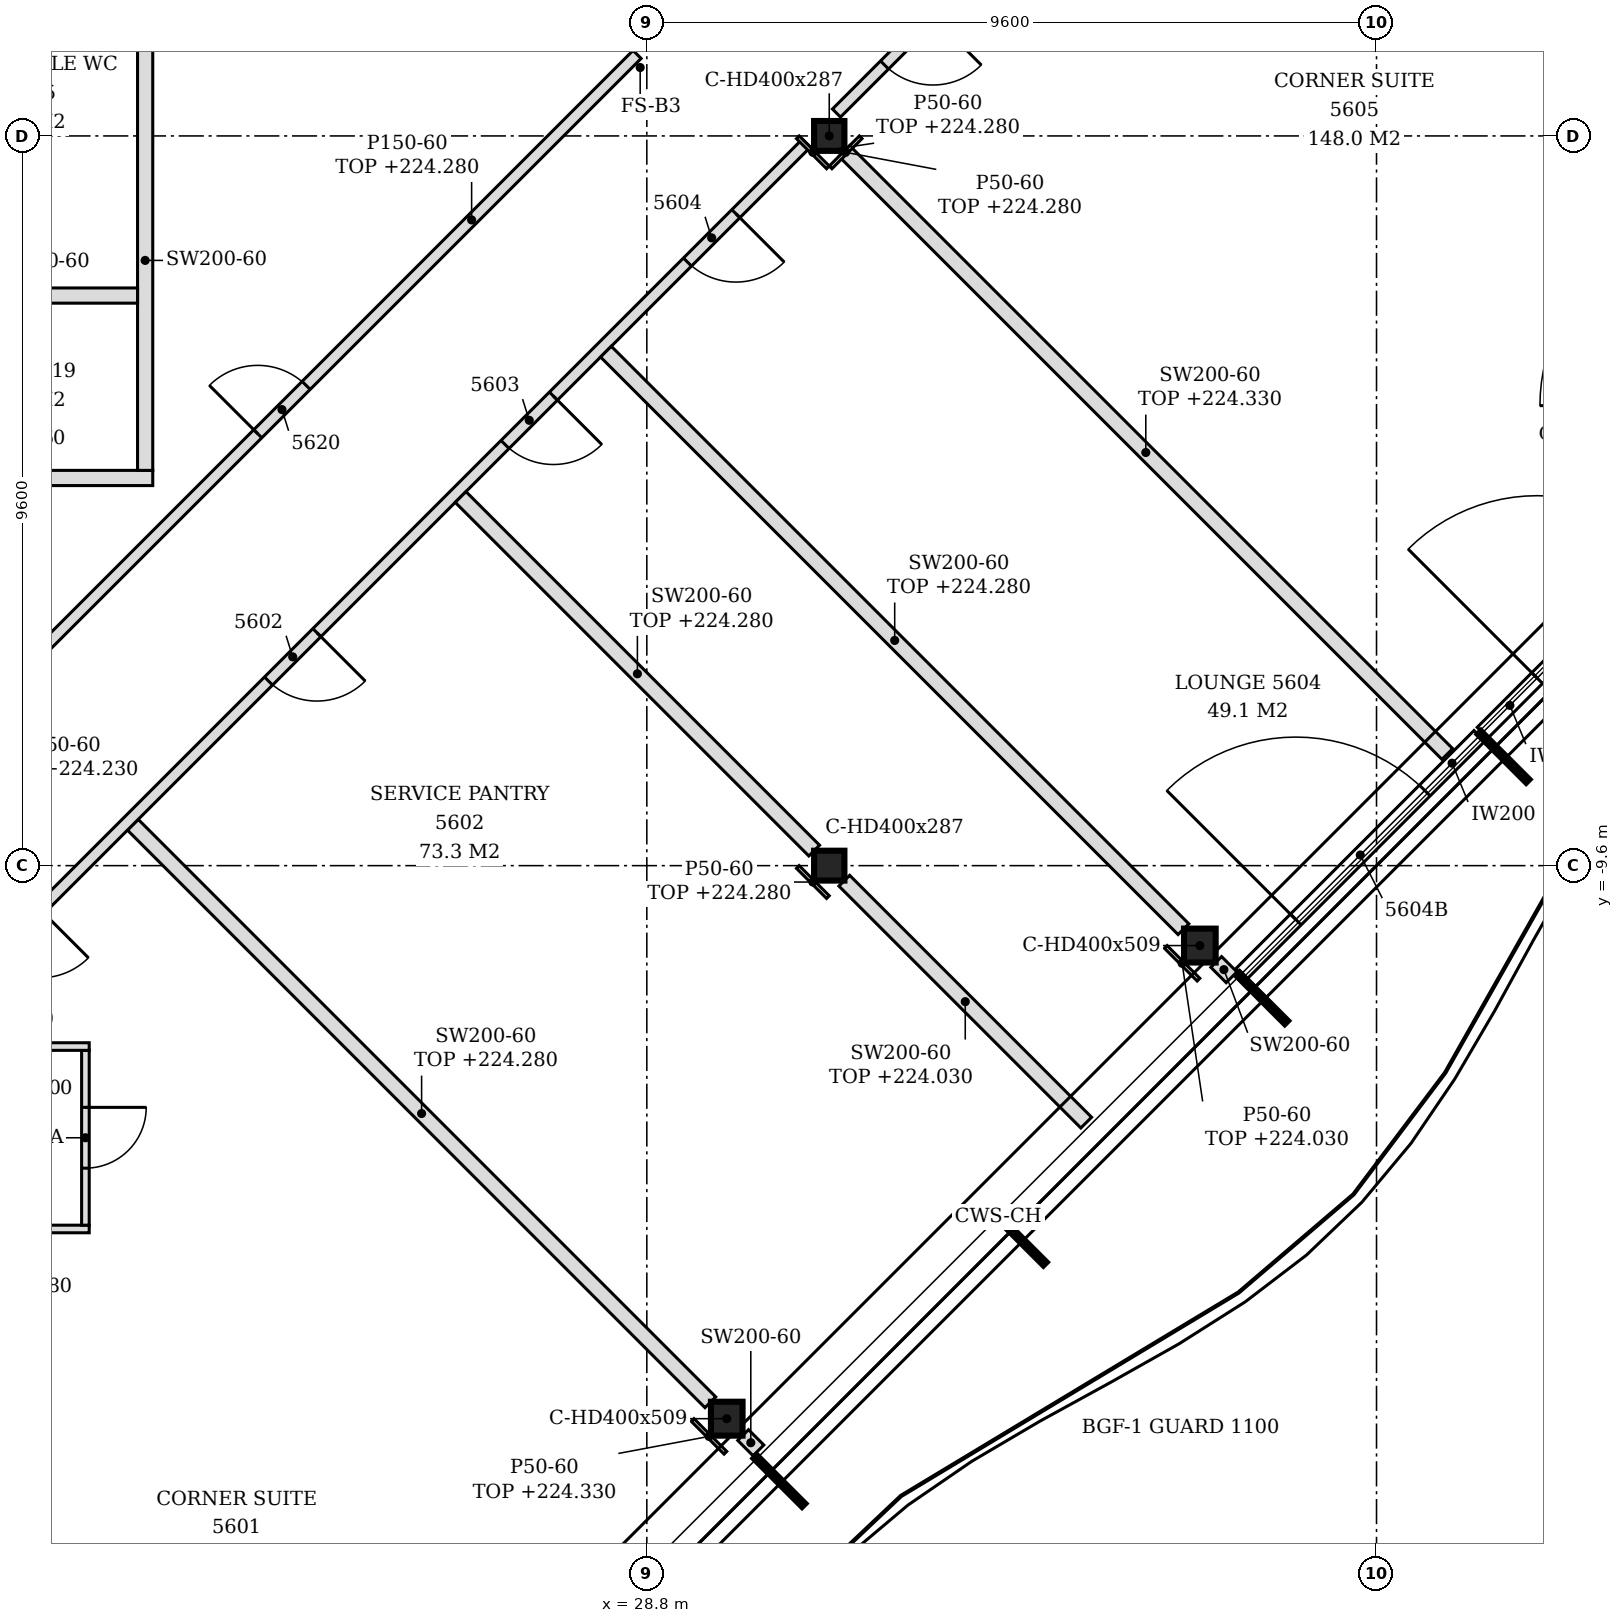
"""IFC4 building model, lengths in metres.
Left out: names, types, materials, properties, quantities, classifications, styles, units other than length and angle.
Written with IfcOpenShell. Run it as: python <this file> out.ifc"""

import sys

from ifc_helpers import new_model, si_unit, direction, frame, frame_2d, origin, origin_2d, place, context, subcontext, project, spatial, polyline, rectangle, i_section, outline, extrude, element, fill, save


model = new_model("IFC4")
c1 = context("Model", 3, precision=1e-05, world=origin(), true_north=direction((0.0, 1.0)))
c2 = subcontext(c1, "Body", "Model", "MODEL_VIEW")
j1 = project(units=[si_unit("LENGTHUNIT", "METRE"), si_unit("PLANEANGLEUNIT", "RADIAN")], contexts=[c1])
p1 = place(None, origin())
s1 = spatial("IfcSite", under=j1, at=p1, CompositionType="ELEMENT")
p2 = place(p1, origin())
s2 = spatial("IfcBuilding", under=s1, at=p2, CompositionType="ELEMENT")
p3 = place(p2, frame((0.0, 0.0, 221.4)))
s3 = spatial("IfcBuildingStorey", under=s2, at=p3, CompositionType="ELEMENT", Elevation=221.4)
for number, where, z_axis, x_axis in (
    (1, (29.852, -16.876, -0.15), (0.0, 0.0, 1.0), (1.0, 0.0, 0.0)),
    (2, (36.076, -10.652, -0.15), (0.0, 0.0, 1.0), (1.0, 0.0, 0.0)),
):
    element("IfcColumn", number, at=place(p3, frame(where, z_axis=z_axis, x_axis=x_axis)), inside=s3, PredefinedType="COLUMN", context=c2, shape_type="SweptSolid", body=[
        extrude(i_section(OverallWidth=0.416, OverallDepth=0.446, WebThickness=0.039, FlangeThickness=0.063, FilletRadius=0.015, at=origin_2d()), origin(), (0.0, 0.0, 1.0), 3.6),
    ])
for number, where, z_axis, x_axis in (
    (3, (31.2, -9.6, -0.15), (0.0, 0.0, 1.0), (1.0, 0.0, 0.0)),
    (4, (31.2, 0.0, -0.15), (0.0, 0.0, 1.0), (1.0, 0.0, 0.0)),
):
    element("IfcColumn", number, at=place(p3, frame(where, z_axis=z_axis, x_axis=x_axis)), inside=s3, PredefinedType="COLUMN", context=c2, shape_type="SweptSolid", body=[
        extrude(i_section(OverallWidth=0.399, OverallDepth=0.393, WebThickness=0.023, FlangeThickness=0.037, FilletRadius=0.015, at=origin_2d()), origin(), (0.0, 0.0, 1.0), 3.6),
    ])
p4 = place(p3, frame((36.62, -11.026, 0.0), z_axis=(0.0, 0.0, 1.0), x_axis=(0.707106781187, 0.707106781187, 0.0)))
e5 = element("IfcWall", 5, at=p4, inside=s3, PredefinedType="NOTDEFINED", context=c2, shape_type="SweptSolid", body=[
    extrude(rectangle(XDim=4.431, YDim=0.2, at=frame_2d((2.215, 0.0))), origin(), (0.0, 0.0, 1.0), 3.45),
])
p5 = place(p4, frame((1.015, 0.0, 0.0)))
e6 = element("IfcOpeningElement", 6, at=p5, cuts=e5, PredefinedType="OPENING", context=c2, shape_type="SweptSolid", body=[
    extrude(rectangle(XDim=2.4, YDim=2.4, at=frame_2d((1.2, 1.2))), frame((0.0, 0.11, 0.0), z_axis=(0.0, -1.0, 0.0), x_axis=(1.0, 0.0, 0.0)), (0.0, 0.0, 1.0), 0.22),
])
p6 = place(p3, frame((39.796, -7.851, 0.0), z_axis=(0.0, 0.0, 1.0), x_axis=(0.707079168996, 0.707134392299, 0.0)))
e7 = element("IfcWall", 7, at=p6, inside=s3, PredefinedType="NOTDEFINED", context=c2, shape_type="SweptSolid", body=[
    extrude(rectangle(XDim=4.421, YDim=0.2, at=frame_2d((2.21, 0.0))), origin(), (0.0, 0.0, 1.0), 3.45),
])
p7 = place(p6, frame((1.015, 0.0, 0.0)))
e8 = element("IfcOpeningElement", 8, at=p7, cuts=e7, PredefinedType="OPENING", context=c2, shape_type="SweptSolid", body=[
    extrude(rectangle(XDim=2.4, YDim=2.4, at=frame_2d((1.2, 1.2))), frame((0.0, 0.11, 0.0), z_axis=(0.0, -1.0, 0.0), x_axis=(1.0, 0.0, 0.0)), (0.0, 0.0, 1.0), 0.22),
])
p8 = place(p3, frame((30.269, -17.293, 0.0), z_axis=(0.0, 0.0, 1.0), x_axis=(-0.707106781187, 0.707106781187, 0.0)))
e9 = element("IfcWall", 9, at=p8, inside=s3, PredefinedType="PARTITIONING", context=c2, shape_type="SweptSolid", body=[
    extrude(rectangle(XDim=0.285, YDim=0.2, at=frame_2d((0.143, 0.0))), origin(), (0.0, 0.0, 1.0), 3.45),
])
p9 = place(p3, frame((29.636, -16.66, 0.0), z_axis=(0.0, 0.0, 1.0), x_axis=(-0.707095420673, 0.707118141518, 0.0)))
e10 = element("IfcWall", 10, at=p9, inside=s3, PredefinedType="PARTITIONING", context=c2, shape_type="SweptSolid", body=[
    extrude(rectangle(XDim=10.745, YDim=0.2, at=frame_2d((5.373, 0.0))), origin(), (0.0, 0.0, 1.0), 2.88),
])
p10 = place(p3, frame((19.114, -14.38, 0.0), z_axis=(0.0, 0.0, 1.0), x_axis=(1.0, 0.0, 0.0)))
e11 = element("IfcWall", 11, at=p10, inside=s3, PredefinedType="PARTITIONING", context=c2, shape_type="SweptSolid", body=[
    extrude(outline(polyline([(0.0, 0.0), (2.35, 0.0), (2.35, 2.88), (0.236, 2.88), (0.234, 2.73), (0.0, 2.73), (0.0, 0.0)])), frame((0.0, 0.05, 0.0), z_axis=(0.0, -1.0, 0.0), x_axis=(1.0, 0.0, 0.0)), (0.0, 0.0, 1.0), 0.1),
])
p11 = place(p3, frame((16.722, -14.272, 0.0), z_axis=(0.0, 0.0, 1.0), x_axis=(0.707106781187, 0.707106781187, 0.0)))
e12 = element("IfcWall", 12, at=p11, inside=s3, PredefinedType="PARTITIONING", context=c2, shape_type="SweptSolid", body=[
    extrude(rectangle(XDim=20.049, YDim=0.15, at=frame_2d((10.025, 0.0))), origin(), (0.0, 0.0, 1.0), 2.73),
])
p12 = place(p11, frame((4.892, 0.0, 0.0)))
e13 = element("IfcOpeningElement", 13, at=p12, cuts=e12, PredefinedType="OPENING", context=c2, shape_type="SweptSolid", body=[
    extrude(rectangle(XDim=0.9, YDim=2.1, at=frame_2d((0.45, 1.05))), frame((0.0, 0.085, 0.0), z_axis=(0.0, -1.0, 0.0), x_axis=(1.0, 0.0, 0.0)), (0.0, 0.0, 1.0), 0.17),
])
p13 = place(p11, frame((10.042, 0.0, 0.0)))
e14 = element("IfcOpeningElement", 14, at=p13, cuts=e12, PredefinedType="OPENING", context=c2, shape_type="SweptSolid", body=[
    extrude(rectangle(XDim=0.9, YDim=2.1, at=frame_2d((0.45, 1.05))), frame((0.0, 0.085, 0.0), z_axis=(0.0, -1.0, 0.0), x_axis=(1.0, 0.0, 0.0)), (0.0, 0.0, 1.0), 0.17),
])
p14 = place(p11, frame((14.443, 0.0, 0.0)))
e15 = element("IfcOpeningElement", 15, at=p14, cuts=e12, PredefinedType="OPENING", context=c2, shape_type="SweptSolid", body=[
    extrude(rectangle(XDim=0.9, YDim=2.1, at=frame_2d((0.45, 1.05))), frame((0.0, 0.085, 0.0), z_axis=(0.0, -1.0, 0.0), x_axis=(1.0, 0.0, 0.0)), (0.0, 0.0, 1.0), 0.17),
])
p15 = place(p11, frame((17.837, 0.0, 0.0)))
e16 = element("IfcOpeningElement", 16, at=p15, cuts=e12, PredefinedType="OPENING", context=c2, shape_type="SweptSolid", body=[
    extrude(rectangle(XDim=0.9, YDim=2.1, at=frame_2d((0.45, 1.05))), frame((0.0, 0.085, 0.0), z_axis=(0.0, -1.0, 0.0), x_axis=(1.0, 0.0, 0.0)), (0.0, 0.0, 1.0), 0.17),
])
p16 = place(p3, frame((21.414, -14.33, 0.0), z_axis=(0.0, 0.0, 1.0), x_axis=(0.0, 1.0, 0.0)))
e17 = element("IfcWall", 17, at=p16, inside=s3, PredefinedType="PARTITIONING", context=c2, shape_type="SweptSolid", body=[
    extrude(outline(polyline([(0.0, 0.0), (2.3, 0.0), (2.3, 3.45), (0.035, 3.45), (0.033, 2.88), (0.0, 2.88), (0.0, 0.0)])), frame((0.0, 0.05, 0.0), z_axis=(0.0, -1.0, 0.0), x_axis=(1.0, 0.0, 0.0)), (0.0, 0.0, 1.0), 0.1),
])
p17 = place(p16, frame((0.75, 0.0, 0.0)))
e18 = element("IfcOpeningElement", 18, at=p17, cuts=e17, PredefinedType="OPENING", context=c2, shape_type="SweptSolid", body=[
    extrude(rectangle(XDim=0.8, YDim=2.1, at=frame_2d((0.4, 1.05))), frame((0.0, 0.06, 0.0), z_axis=(0.0, -1.0, 0.0), x_axis=(1.0, 0.0, 0.0)), (0.0, 0.0, 1.0), 0.12),
])
p18 = place(p3, frame((34.581, -12.981, 0.0), z_axis=(0.0, 0.0, 1.0), x_axis=(-0.707133900936, 0.707079660397, 0.0)))
e19 = element("IfcWall", 19, at=p18, inside=s3, PredefinedType="PARTITIONING", context=c2, shape_type="SweptSolid", body=[
    extrude(rectangle(XDim=4.501, YDim=0.2, at=frame_2d((2.25, 0.0))), origin(), (0.0, 0.0, 1.0), 2.63),
])
p19 = place(p3, frame((19.17, -11.98, 0.0), z_axis=(0.0, 0.0, 1.0), x_axis=(1.0, 0.0, 0.0)))
e20 = element("IfcWall", 20, at=p19, inside=s3, PredefinedType="PARTITIONING", context=c2, shape_type="SweptSolid", body=[
    extrude(outline(polyline([(0.0, 0.0), (2.294, 0.0), (2.294, 3.45), (0.18, 3.45), (0.178, 2.73), (0.0, 2.73), (0.0, 0.0)])), frame((0.0, 0.05, 0.0), z_axis=(0.0, -1.0, 0.0), x_axis=(1.0, 0.0, 0.0)), (0.0, 0.0, 1.0), 0.1),
])
p20 = place(p3, frame((36.493, -11.069, 0.0), z_axis=(0.0, 0.0, 1.0), x_axis=(-0.707534423513, 0.706678880075, 0.0)))
e21 = element("IfcWall", 21, at=p20, inside=s3, PredefinedType="PARTITIONING", context=c2, shape_type="SweptSolid", body=[
    extrude(rectangle(XDim=0.285, YDim=0.2, at=frame_2d((0.143, 0.0))), origin(), (0.0, 0.0, 1.0), 3.45),
])
p21 = place(p3, frame((35.86, -10.436, 0.0), z_axis=(0.0, 0.0, 1.0), x_axis=(-0.707106781187, 0.707106781187, 0.0)))
e22 = element("IfcWall", 22, at=p21, inside=s3, PredefinedType="PARTITIONING", context=c2, shape_type="SweptSolid", body=[
    extrude(rectangle(XDim=10.745, YDim=0.2, at=frame_2d((5.373, 0.0))), origin(), (0.0, 0.0, 1.0), 2.88),
])
p22 = place(p3, frame((31.002, -9.402, 0.0), z_axis=(0.0, 0.0, 1.0), x_axis=(-0.707088226093, 0.707125335793, 0.0)))
e23 = element("IfcWall", 23, at=p22, inside=s3, PredefinedType="PARTITIONING", context=c2, shape_type="SweptSolid", body=[
    extrude(rectangle(XDim=6.579, YDim=0.2, at=frame_2d((3.29, 0.0))), origin(), (0.0, 0.0, 1.0), 2.88),
])
p23 = place(p3, frame((19.398, -8.202, 0.0), z_axis=(0.0, 0.0, 1.0), x_axis=(0.707116088468, 0.707097473782, 0.0)))
e24 = element("IfcWall", 24, at=p23, inside=s3, PredefinedType="PARTITIONING", context=c2, shape_type="SweptSolid", body=[
    extrude(rectangle(XDim=13.115, YDim=0.15, at=frame_2d((6.558, 0.0))), origin(), (0.0, 0.0, 1.0), 2.88),
])
p24 = place(p23, frame((6.058, 0.0, 0.0)))
e25 = element("IfcOpeningElement", 25, at=p24, cuts=e24, PredefinedType="OPENING", context=c2, shape_type="SweptSolid", body=[
    extrude(rectangle(XDim=0.9, YDim=2.1, at=frame_2d((0.45, 1.05))), frame((0.0, 0.085, 0.0), z_axis=(0.0, -1.0, 0.0), x_axis=(1.0, 0.0, 0.0)), (0.0, 0.0, 1.0), 0.17),
])
p25 = place(p3, frame((39.331, -8.131, 0.0), z_axis=(0.0, 0.0, 1.0), x_axis=(-0.707106781187, 0.707106781187, 0.0)))
e26 = element("IfcWall", 26, at=p25, inside=s3, PredefinedType="PARTITIONING", context=c2, shape_type="SweptSolid", body=[
    extrude(rectangle(XDim=11.219, YDim=0.2, at=frame_2d((5.61, 0.0))), origin(), (0.0, 0.0, 1.0), 2.93),
])
p26 = place(p3, frame((19.275, -4.5, 0.0), z_axis=(0.0, 0.0, 1.0), x_axis=(1.0, 0.0, 0.0)))
e27 = element("IfcWall", 27, at=p26, inside=s3, PredefinedType="PARTITIONING", context=c2, shape_type="SweptSolid", body=[
    extrude(outline(polyline([(0.0, 0.0), (3.025, 0.0), (3.025, 3.45), (0.075, 3.45), (0.073, 2.83), (0.0, 2.83), (0.0, 0.0)])), frame((0.0, 0.1, 0.0), z_axis=(0.0, -1.0, 0.0), x_axis=(1.0, 0.0, 0.0)), (0.0, 0.0, 1.0), 0.2),
])
p27 = place(p3, frame((22.2, -4.4, 0.0), z_axis=(0.0, 0.0, 1.0), x_axis=(0.0, 1.0, 0.0)))
e28 = element("IfcWall", 28, at=p27, inside=s3, PredefinedType="PARTITIONING", context=c2, shape_type="SweptSolid", body=[
    extrude(outline(polyline([(0.0, 0.0), (5.525, 0.0), (5.525, 3.45), (4.505, 3.45), (4.503, 2.88), (4.295, 2.88), (4.293, 3.45), (0.0, 3.45), (0.0, 0.0)])), frame((0.0, 0.1, 0.0), z_axis=(0.0, -1.0, 0.0), x_axis=(1.0, 0.0, 0.0)), (0.0, 0.0, 1.0), 0.2),
])
p28 = place(p3, frame((19.275, -2.1, 0.0), z_axis=(0.0, 0.0, 1.0), x_axis=(1.0, 0.0, 0.0)))
e29 = element("IfcWall", 29, at=p28, inside=s3, PredefinedType="PARTITIONING", context=c2, shape_type="SweptSolid", body=[
    extrude(outline(polyline([(0.0, 0.0), (2.825, 0.0), (2.825, 3.45), (0.075, 3.45), (0.073, 2.83), (0.0, 2.83), (0.0, 0.0)])), frame((0.0, 0.1, 0.0), z_axis=(0.0, -1.0, 0.0), x_axis=(1.0, 0.0, 0.0)), (0.0, 0.0, 1.0), 0.2),
])
p29 = place(p3, frame((31.295, 0.301, 0.0), z_axis=(0.0, 0.0, 1.0), x_axis=(0.707146890479, 0.707066669618, 0.0)))
e30 = element("IfcWall", 30, at=p29, inside=s3, PredefinedType="PARTITIONING", context=c2, shape_type="SweptSolid", body=[
    extrude(rectangle(XDim=3.043, YDim=0.15, at=frame_2d((1.522, 0.0))), origin(), (0.0, 0.0, 1.0), 2.93),
])
p30 = place(p29, frame((0.895, 0.0, 0.0)))
e31 = element("IfcOpeningElement", 31, at=p30, cuts=e30, PredefinedType="OPENING", context=c2, shape_type="SweptSolid", body=[
    extrude(rectangle(XDim=0.9, YDim=2.1, at=frame_2d((0.45, 1.05))), frame((0.0, 0.085, 0.0), z_axis=(0.0, -1.0, 0.0), x_axis=(1.0, 0.0, 0.0)), (0.0, 0.0, 1.0), 0.17),
])
p31 = place(p3, frame((29.834, -17.324, 0.0), z_axis=(0.0, 0.0, 1.0), x_axis=(-0.706906496032, 0.707307009627, 0.0)))
e32 = element("IfcWall", 32, at=p31, inside=s3, PredefinedType="PARTITIONING", context=c2, shape_type="SweptSolid", body=[
    extrude(rectangle(XDim=0.61, YDim=0.05, at=frame_2d((0.305, 0.0))), origin(), (0.0, 0.0, 1.0), 2.93),
])
p32 = place(p3, frame((31.218, -0.414, 0.0), z_axis=(0.0, 0.0, 1.0), x_axis=(0.706888841063, 0.707324654159, 0.0)))
e33 = element("IfcWall", 33, at=p32, inside=s3, PredefinedType="PARTITIONING", context=c2, shape_type="SweptSolid", body=[
    extrude(rectangle(XDim=0.56, YDim=0.05, at=frame_2d((0.28, 0.0))), origin(), (0.0, 0.0, 1.0), 2.88),
])
p33 = place(p3, frame((31.182, -10.014, 0.0), z_axis=(0.0, 0.0, 1.0), x_axis=(-0.707106781187, 0.707106781187, 0.0)))
e34 = element("IfcWall", 34, at=p33, inside=s3, PredefinedType="PARTITIONING", context=c2, shape_type="SweptSolid", body=[
    extrude(rectangle(XDim=0.56, YDim=0.05, at=frame_2d((0.28, 0.0))), origin(), (0.0, 0.0, 1.0), 2.88),
])
p34 = place(p3, frame((36.058, -11.1, 0.0), z_axis=(0.0, 0.0, 1.0), x_axis=(-0.707307009627, 0.706906496032, 0.0)))
e35 = element("IfcWall", 35, at=p34, inside=s3, PredefinedType="PARTITIONING", context=c2, shape_type="SweptSolid", body=[
    extrude(rectangle(XDim=0.61, YDim=0.05, at=frame_2d((0.305, 0.0))), origin(), (0.0, 0.0, 1.0), 2.63),
])
p35 = place(p3, frame((31.182, -0.414, 0.0), z_axis=(0.0, 0.0, 1.0), x_axis=(-0.706888841063, 0.707324654159, 0.0)))
e36 = element("IfcWall", 36, at=p35, inside=s3, PredefinedType="PARTITIONING", context=c2, shape_type="SweptSolid", body=[
    extrude(rectangle(XDim=0.56, YDim=0.05, at=frame_2d((0.28, 0.0))), origin(), (0.0, 0.0, 1.0), 2.88),
])
p36 = place(p5, origin())
e37 = element("IfcDoor", 37, at=p36, inside=s3, OperationType="SINGLE_SWING_LEFT", PredefinedType="DOOR", context=c2, shape_type="SweptSolid", body=[
    extrude(rectangle(XDim=2.4, YDim=2.4, at=frame_2d((1.2, 1.2))), frame((0.0, 0.025, 0.0), z_axis=(0.0, -1.0, 0.0), x_axis=(1.0, 0.0, 0.0)), (0.0, 0.0, 1.0), 0.05),
])
fill(e6, e37)
p37 = place(p7, origin())
e38 = element("IfcDoor", 38, at=p37, inside=s3, OperationType="SINGLE_SWING_LEFT", PredefinedType="DOOR", context=c2, shape_type="SweptSolid", body=[
    extrude(rectangle(XDim=2.4, YDim=2.4, at=frame_2d((1.2, 1.2))), frame((0.0, 0.025, 0.0), z_axis=(0.0, -1.0, 0.0), x_axis=(1.0, 0.0, 0.0)), (0.0, 0.0, 1.0), 0.05),
])
fill(e8, e38)
p38 = place(p17, frame((0.8, 0.0, 0.0), z_axis=(0.0, 0.0, 1.0), x_axis=(-1.0, 0.0, 0.0)))
e39 = element("IfcDoor", 39, at=p38, inside=s3, OperationType="SINGLE_SWING_LEFT", PredefinedType="DOOR", context=c2, shape_type="SweptSolid", body=[
    extrude(rectangle(XDim=0.8, YDim=2.1, at=frame_2d((0.4, 1.05))), frame((0.0, 0.025, 0.0), z_axis=(0.0, -1.0, 0.0), x_axis=(1.0, 0.0, 0.0)), (0.0, 0.0, 1.0), 0.05),
])
fill(e18, e39)
p39 = place(p13, frame((0.9, 0.0, 0.0), z_axis=(0.0, 0.0, 1.0), x_axis=(-1.0, 0.0, 0.0)))
e40 = element("IfcDoor", 40, at=p39, inside=s3, OperationType="SINGLE_SWING_LEFT", PredefinedType="DOOR", context=c2, shape_type="SweptSolid", body=[
    extrude(rectangle(XDim=0.9, YDim=2.1, at=frame_2d((0.45, 1.05))), frame((0.0, 0.025, 0.0), z_axis=(0.0, -1.0, 0.0), x_axis=(1.0, 0.0, 0.0)), (0.0, 0.0, 1.0), 0.05),
])
fill(e14, e40)
p40 = place(p14, frame((0.9, 0.0, 0.0), z_axis=(0.0, 0.0, 1.0), x_axis=(-1.0, 0.0, 0.0)))
e41 = element("IfcDoor", 41, at=p40, inside=s3, OperationType="SINGLE_SWING_LEFT", PredefinedType="DOOR", context=c2, shape_type="SweptSolid", body=[
    extrude(rectangle(XDim=0.9, YDim=2.1, at=frame_2d((0.45, 1.05))), frame((0.0, 0.025, 0.0), z_axis=(0.0, -1.0, 0.0), x_axis=(1.0, 0.0, 0.0)), (0.0, 0.0, 1.0), 0.05),
])
fill(e15, e41)
p41 = place(p15, frame((0.9, 0.0, 0.0), z_axis=(0.0, 0.0, 1.0), x_axis=(-1.0, 0.0, 0.0)))
e42 = element("IfcDoor", 42, at=p41, inside=s3, OperationType="SINGLE_SWING_LEFT", PredefinedType="DOOR", context=c2, shape_type="SweptSolid", body=[
    extrude(rectangle(XDim=0.9, YDim=2.1, at=frame_2d((0.45, 1.05))), frame((0.0, 0.025, 0.0), z_axis=(0.0, -1.0, 0.0), x_axis=(1.0, 0.0, 0.0)), (0.0, 0.0, 1.0), 0.05),
])
fill(e16, e42)
p42 = place(p30, frame((0.9, 0.0, 0.0), z_axis=(0.0, 0.0, 1.0), x_axis=(-1.0, 0.0, 0.0)))
e43 = element("IfcDoor", 43, at=p42, inside=s3, OperationType="SINGLE_SWING_LEFT", PredefinedType="DOOR", context=c2, shape_type="SweptSolid", body=[
    extrude(rectangle(XDim=0.9, YDim=2.1, at=frame_2d((0.45, 1.05))), frame((0.0, 0.025, 0.0), z_axis=(0.0, -1.0, 0.0), x_axis=(1.0, 0.0, 0.0)), (0.0, 0.0, 1.0), 0.05),
])
fill(e31, e43)
p43 = place(p24, origin())
e44 = element("IfcDoor", 44, at=p43, inside=s3, OperationType="SINGLE_SWING_LEFT", PredefinedType="DOOR", context=c2, shape_type="SweptSolid", body=[
    extrude(rectangle(XDim=0.9, YDim=2.1, at=frame_2d((0.45, 1.05))), frame((0.0, 0.025, 0.0), z_axis=(0.0, -1.0, 0.0), x_axis=(1.0, 0.0, 0.0)), (0.0, 0.0, 1.0), 0.05),
])
fill(e25, e44)
save(model, sys.argv[1])
